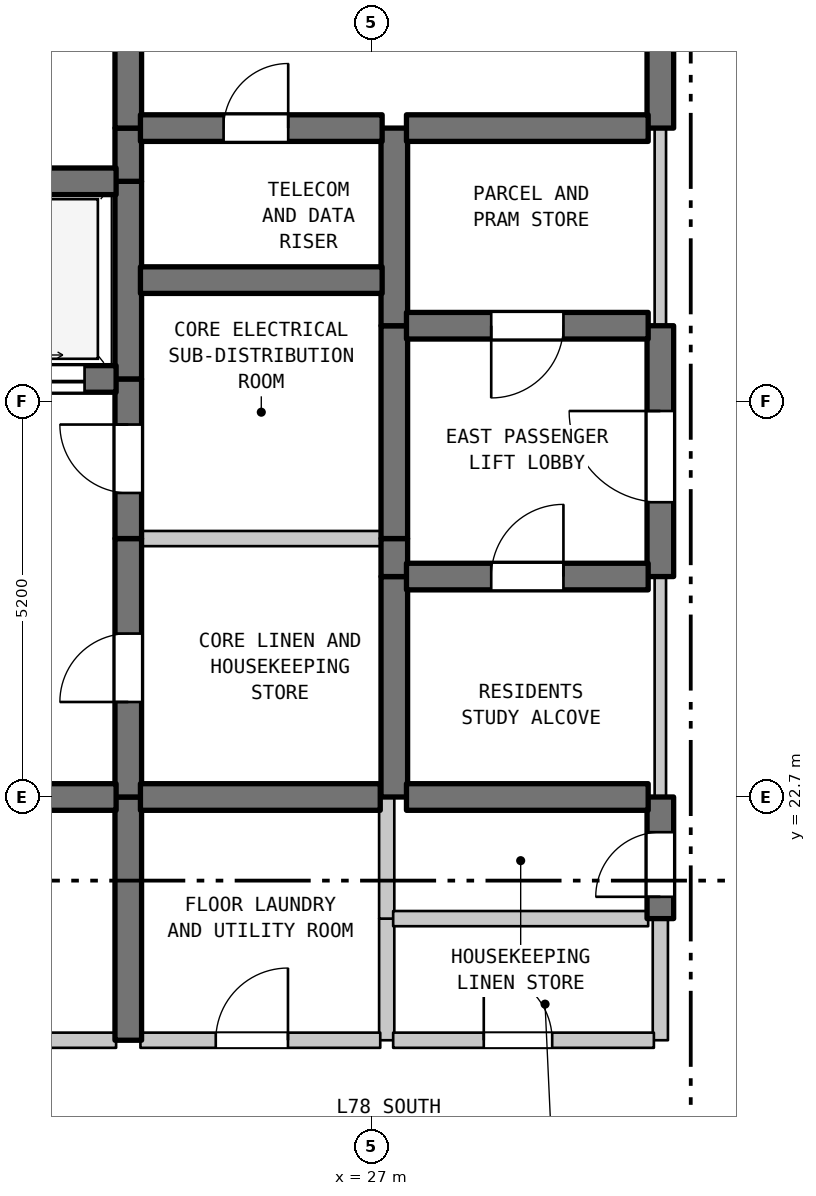
"""IFC4 building model, lengths in metres.
Left out: names, types, materials, properties, quantities, classifications, styles, units other than length and angle.
Written with IfcOpenShell. Run it as: python <this file> out.ifc"""

import sys

from ifc_helpers import new_model, si_unit, direction, frame, frame_2d, origin, place, context, subcontext, project, spatial, rectangle, extrude, element, fill, save


model = new_model("IFC4")
c1 = context("Model", 3, precision=1e-05, world=origin(), true_north=direction((0.0, 1.0)))
c2 = subcontext(c1, "Body", "Model", "MODEL_VIEW")
j1 = project(units=[si_unit("LENGTHUNIT", "METRE"), si_unit("PLANEANGLEUNIT", "RADIAN")], contexts=[c1])
p1 = place(None, origin())
s1 = spatial("IfcSite", under=j1, at=p1, CompositionType="ELEMENT")
p2 = place(p1, origin())
s2 = spatial("IfcBuilding", under=s1, at=p2, CompositionType="ELEMENT")
p3 = place(p2, frame((0.0, 0.0, 311.0)))
s3 = spatial("IfcBuildingStorey", under=s2, at=p3, CompositionType="ELEMENT", Elevation=311.0)
p4 = place(p3, frame((23.8, 19.5, 0.0), z_axis=(0.0, 0.0, 1.0), x_axis=(0.0, 1.0, 0.0)))
e1 = element("IfcWall", 1, at=p4, inside=s3, PredefinedType="SHEAR", context=c2, shape_type="SweptSolid", body=[
    extrude(rectangle(XDim=3.2, YDim=0.35, at=frame_2d((1.6, 0.0))), origin(), (0.0, 0.0, 1.0), 3.28),
])
p5 = place(p3, frame((23.8, 22.7, 0.0), z_axis=(0.0, 0.0, 1.0), x_axis=(0.0, 1.0, 0.0)))
e2 = element("IfcWall", 2, at=p5, inside=s3, PredefinedType="SHEAR", context=c2, shape_type="SweptSolid", body=[
    extrude(rectangle(XDim=3.4, YDim=0.35, at=frame_2d((1.7, 0.0))), origin(), (0.0, 0.0, 1.0), 3.28),
])
p6 = place(p5, frame((1.25, 0.0, 0.0)))
e3 = element("IfcOpeningElement", 3, at=p6, cuts=e2, PredefinedType="OPENING", context=c2, shape_type="SweptSolid", body=[
    extrude(rectangle(XDim=0.9, YDim=2.15, at=frame_2d((0.45, 1.075))), frame((0.0, 0.185, 0.0), z_axis=(0.0, -1.0, 0.0), x_axis=(1.0, 0.0, 0.0)), (0.0, 0.0, 1.0), 0.37),
])
p7 = place(p3, frame((23.8, 26.1, 0.0), z_axis=(0.0, 0.0, 1.0), x_axis=(0.0, 1.0, 0.0)))
e4 = element("IfcWall", 4, at=p7, inside=s3, PredefinedType="SHEAR", context=c2, shape_type="SweptSolid", body=[
    extrude(rectangle(XDim=2.1, YDim=0.35, at=frame_2d((1.05, 0.0))), origin(), (0.0, 0.0, 1.0), 3.28),
])
p8 = place(p7, frame((0.6, 0.0, 0.0)))
e5 = element("IfcOpeningElement", 5, at=p8, cuts=e4, PredefinedType="OPENING", context=c2, shape_type="SweptSolid", body=[
    extrude(rectangle(XDim=0.9, YDim=2.15, at=frame_2d((0.45, 1.075))), frame((0.0, 0.185, 0.0), z_axis=(0.0, -1.0, 0.0), x_axis=(1.0, 0.0, 0.0)), (0.0, 0.0, 1.0), 0.37),
])
p9 = place(p3, frame((23.8, 28.2, 0.0), z_axis=(0.0, 0.0, 1.0), x_axis=(0.0, 1.0, 0.0)))
e6 = element("IfcWall", 6, at=p9, inside=s3, PredefinedType="SHEAR", context=c2, shape_type="SweptSolid", body=[
    extrude(rectangle(XDim=2.6, YDim=0.35, at=frame_2d((1.3, 0.0))), origin(), (0.0, 0.0, 1.0), 3.28),
])
p10 = place(p3, frame((23.8, 30.8, 0.0), z_axis=(0.0, 0.0, 1.0), x_axis=(0.0, 1.0, 0.0)))
e7 = element("IfcWall", 7, at=p10, inside=s3, PredefinedType="SHEAR", context=c2, shape_type="SweptSolid", body=[
    extrude(rectangle(XDim=0.7, YDim=0.35, at=frame_2d((0.35, 0.0))), origin(), (0.0, 0.0, 1.0), 3.28),
])
p11 = place(p3, frame((23.8, 31.5, 0.0), z_axis=(0.0, 0.0, 1.0), x_axis=(0.0, 1.0, 0.0)))
e8 = element("IfcWall", 8, at=p11, inside=s3, PredefinedType="SHEAR", context=c2, shape_type="SweptSolid", body=[
    extrude(rectangle(XDim=3.5, YDim=0.35, at=frame_2d((1.75, 0.0))), origin(), (0.0, 0.0, 1.0), 3.28),
])
p12 = place(p11, frame((1.127, 0.0, 0.0)))
e9 = element("IfcOpeningElement", 9, at=p12, cuts=e8, PredefinedType="OPENING", context=c2, shape_type="SweptSolid", body=[
    extrude(rectangle(XDim=1.1, YDim=2.15, at=frame_2d((0.55, 1.075))), frame((0.0, 0.185, 0.0), z_axis=(0.0, -1.0, 0.0), x_axis=(1.0, 0.0, 0.0)), (0.0, 0.0, 1.0), 0.37),
])
p13 = place(p3, frame((27.2, 19.5, 0.0), z_axis=(0.0, 0.0, 1.0), x_axis=(0.0, 1.0, 0.0)))
e10 = element("IfcWall", 10, at=p13, inside=s3, PredefinedType="STANDARD", context=c2, shape_type="SweptSolid", body=[
    extrude(rectangle(XDim=1.6, YDim=0.2, at=frame_2d((0.8, 0.0))), origin(), (0.0, 0.0, 1.0), 3.28),
])
p14 = place(p3, frame((27.2, 21.1, 0.0), z_axis=(0.0, 0.0, 1.0), x_axis=(0.0, 1.0, 0.0)))
e11 = element("IfcWall", 11, at=p14, inside=s3, PredefinedType="STANDARD", context=c2, shape_type="SweptSolid", body=[
    extrude(rectangle(XDim=1.6, YDim=0.2, at=frame_2d((0.8, 0.0))), origin(), (0.0, 0.0, 1.0), 3.28),
])
p15 = place(p3, frame((27.3, 22.7, 0.0), z_axis=(0.0, 0.0, 1.0), x_axis=(0.0, 1.0, 0.0)))
e12 = element("IfcWall", 12, at=p15, inside=s3, PredefinedType="SHEAR", context=c2, shape_type="SweptSolid", body=[
    extrude(rectangle(XDim=2.9, YDim=0.35, at=frame_2d((1.45, 0.0))), origin(), (0.0, 0.0, 1.0), 3.28),
])
p16 = place(p3, frame((27.3, 25.6, 0.0), z_axis=(0.0, 0.0, 1.0), x_axis=(0.0, 1.0, 0.0)))
e13 = element("IfcWall", 13, at=p16, inside=s3, PredefinedType="SHEAR", context=c2, shape_type="SweptSolid", body=[
    extrude(rectangle(XDim=0.5, YDim=0.35, at=frame_2d((0.25, 0.0))), origin(), (0.0, 0.0, 1.0), 3.28),
])
p17 = place(p3, frame((27.3, 26.1, 0.0), z_axis=(0.0, 0.0, 1.0), x_axis=(0.0, 1.0, 0.0)))
e14 = element("IfcWall", 14, at=p17, inside=s3, PredefinedType="SHEAR", context=c2, shape_type="SweptSolid", body=[
    extrude(rectangle(XDim=2.8, YDim=0.35, at=frame_2d((1.4, 0.0))), origin(), (0.0, 0.0, 1.0), 3.28),
])
p18 = place(p3, frame((27.3, 28.9, 0.0), z_axis=(0.0, 0.0, 1.0), x_axis=(0.0, 1.0, 0.0)))
e15 = element("IfcWall", 15, at=p18, inside=s3, PredefinedType="SHEAR", context=c2, shape_type="SweptSolid", body=[
    extrude(rectangle(XDim=2.6, YDim=0.35, at=frame_2d((1.3, 0.0))), origin(), (0.0, 0.0, 1.0), 3.28),
])
p19 = place(p3, frame((30.8, 19.5, 0.0), z_axis=(0.0, 0.0, 1.0), x_axis=(0.0, 1.0, 0.0)))
e16 = element("IfcWall", 16, at=p19, inside=s3, PredefinedType="STANDARD", context=c2, shape_type="SweptSolid", body=[
    extrude(rectangle(XDim=1.6, YDim=0.2, at=frame_2d((0.8, 0.0))), origin(), (0.0, 0.0, 1.0), 3.28),
])
p20 = place(p3, frame((30.8, 21.1, 0.0), z_axis=(0.0, 0.0, 1.0), x_axis=(0.0, 1.0, 0.0)))
e17 = element("IfcWall", 17, at=p20, inside=s3, PredefinedType="SHEAR", context=c2, shape_type="SweptSolid", body=[
    extrude(rectangle(XDim=1.6, YDim=0.35, at=frame_2d((0.8, 0.0))), origin(), (0.0, 0.0, 1.0), 3.28),
])
p21 = place(p20, frame((0.287, 0.0, 0.0)))
e18 = element("IfcOpeningElement", 18, at=p21, cuts=e17, PredefinedType="OPENING", context=c2, shape_type="SweptSolid", body=[
    extrude(rectangle(XDim=0.85, YDim=2.1, at=frame_2d((0.425, 1.05))), frame((0.0, 0.185, 0.0), z_axis=(0.0, -1.0, 0.0), x_axis=(1.0, 0.0, 0.0)), (0.0, 0.0, 1.0), 0.37),
])
p22 = place(p3, frame((30.8, 22.7, 0.0), z_axis=(0.0, 0.0, 1.0), x_axis=(0.0, 1.0, 0.0)))
e19 = element("IfcWall", 19, at=p22, inside=s3, PredefinedType="STANDARD", context=c2, shape_type="SweptSolid", body=[
    extrude(rectangle(XDim=2.9, YDim=0.15, at=frame_2d((1.45, 0.0))), origin(), (0.0, 0.0, 1.0), 3.28),
])
p23 = place(p3, frame((30.8, 25.6, 0.0), z_axis=(0.0, 0.0, 1.0), x_axis=(0.0, 1.0, 0.0)))
e20 = element("IfcWall", 20, at=p23, inside=s3, PredefinedType="SHEAR", context=c2, shape_type="SweptSolid", body=[
    extrude(rectangle(XDim=3.3, YDim=0.35, at=frame_2d((1.65, 0.0))), origin(), (0.0, 0.0, 1.0), 3.28),
])
p24 = place(p23, frame((0.978, 0.0, 0.0)))
e21 = element("IfcOpeningElement", 21, at=p24, cuts=e20, PredefinedType="OPENING", context=c2, shape_type="SweptSolid", body=[
    extrude(rectangle(XDim=1.2, YDim=2.2, at=frame_2d((0.6, 1.1))), frame((0.0, 0.185, 0.0), z_axis=(0.0, -1.0, 0.0), x_axis=(1.0, 0.0, 0.0)), (0.0, 0.0, 1.0), 0.37),
])
p25 = place(p3, frame((30.8, 28.9, 0.0), z_axis=(0.0, 0.0, 1.0), x_axis=(0.0, 1.0, 0.0)))
e22 = element("IfcWall", 22, at=p25, inside=s3, PredefinedType="STANDARD", context=c2, shape_type="SweptSolid", body=[
    extrude(rectangle(XDim=2.6, YDim=0.15, at=frame_2d((1.3, 0.0))), origin(), (0.0, 0.0, 1.0), 3.28),
])
p26 = place(p3, frame((30.8, 31.5, 0.0), z_axis=(0.0, 0.0, 1.0), x_axis=(0.0, 1.0, 0.0)))
e23 = element("IfcWall", 23, at=p26, inside=s3, PredefinedType="SHEAR", context=c2, shape_type="SweptSolid", body=[
    extrude(rectangle(XDim=3.5, YDim=0.35, at=frame_2d((1.75, 0.0))), origin(), (0.0, 0.0, 1.0), 3.28),
])
p27 = place(p26, frame((1.15, 0.0, 0.0)))
e24 = element("IfcOpeningElement", 24, at=p27, cuts=e23, PredefinedType="OPENING", context=c2, shape_type="SweptSolid", body=[
    extrude(rectangle(XDim=1.2, YDim=2.2, at=frame_2d((0.6, 1.1))), frame((0.0, 0.185, 0.0), z_axis=(0.0, -1.0, 0.0), x_axis=(1.0, 0.0, 0.0)), (0.0, 0.0, 1.0), 0.37),
])
p28 = place(p3, frame((19.16, 19.5, 0.0), z_axis=(0.0, 0.0, 1.0), x_axis=(1.0, 0.0, 0.0)))
e25 = element("IfcWall", 25, at=p28, inside=s3, PredefinedType="STANDARD", context=c2, shape_type="SweptSolid", body=[
    extrude(rectangle(XDim=4.48, YDim=0.2, at=frame_2d((2.24, 0.0))), origin(), (0.0, 0.0, 1.0), 3.28),
])
p29 = place(p28, frame((1.64, 0.0, 0.0)))
e26 = element("IfcOpeningElement", 26, at=p29, cuts=e25, PredefinedType="OPENING", context=c2, shape_type="SweptSolid", body=[
    extrude(rectangle(XDim=1.2, YDim=2.2, at=frame_2d((0.6, 1.1))), frame((0.0, 0.11, 0.0), z_axis=(0.0, -1.0, 0.0), x_axis=(1.0, 0.0, 0.0)), (0.0, 0.0, 1.0), 0.22),
])
p30 = place(p3, frame((23.96, 19.5, 0.0), z_axis=(0.0, 0.0, 1.0), x_axis=(1.0, 0.0, 0.0)))
e27 = element("IfcWall", 27, at=p30, inside=s3, PredefinedType="STANDARD", context=c2, shape_type="SweptSolid", body=[
    extrude(rectangle(XDim=3.155, YDim=0.2, at=frame_2d((1.578, 0.0))), origin(), (0.0, 0.0, 1.0), 3.28),
])
p31 = place(p30, frame((0.991, 0.0, 0.0)))
e28 = element("IfcOpeningElement", 28, at=p31, cuts=e27, PredefinedType="OPENING", context=c2, shape_type="SweptSolid", body=[
    extrude(rectangle(XDim=0.95, YDim=2.15, at=frame_2d((0.475, 1.075))), frame((0.0, 0.11, 0.0), z_axis=(0.0, -1.0, 0.0), x_axis=(1.0, 0.0, 0.0)), (0.0, 0.0, 1.0), 0.22),
])
p32 = place(p3, frame((27.285, 19.5, 0.0), z_axis=(0.0, 0.0, 1.0), x_axis=(1.0, 0.0, 0.0)))
e29 = element("IfcWall", 29, at=p32, inside=s3, PredefinedType="STANDARD", context=c2, shape_type="SweptSolid", body=[
    extrude(rectangle(XDim=3.43, YDim=0.2, at=frame_2d((1.715, 0.0))), origin(), (0.0, 0.0, 1.0), 3.28),
])
p33 = place(p32, frame((1.192, 0.0, 0.0)))
e30 = element("IfcOpeningElement", 30, at=p33, cuts=e29, PredefinedType="OPENING", context=c2, shape_type="SweptSolid", body=[
    extrude(rectangle(XDim=0.9, YDim=2.15, at=frame_2d((0.45, 1.075))), frame((0.0, 0.11, 0.0), z_axis=(0.0, -1.0, 0.0), x_axis=(1.0, 0.0, 0.0)), (0.0, 0.0, 1.0), 0.22),
])
p34 = place(p3, frame((27.285, 21.1, 0.0), z_axis=(0.0, 0.0, 1.0), x_axis=(1.0, 0.0, 0.0)))
e31 = element("IfcWall", 31, at=p34, inside=s3, PredefinedType="STANDARD", context=c2, shape_type="SweptSolid", body=[
    extrude(rectangle(XDim=3.355, YDim=0.2, at=frame_2d((1.677, 0.0))), origin(), (0.0, 0.0, 1.0), 3.28),
])
p35 = place(p3, frame((19.16, 22.7, 0.0), z_axis=(0.0, 0.0, 1.0), x_axis=(1.0, 0.0, 0.0)))
e32 = element("IfcWall", 32, at=p35, inside=s3, PredefinedType="SHEAR", context=c2, shape_type="SweptSolid", body=[
    extrude(rectangle(XDim=4.48, YDim=0.35, at=frame_2d((2.24, 0.0))), origin(), (0.0, 0.0, 1.0), 3.28),
])
p36 = place(p35, frame((1.64, 0.0, 0.0)))
e33 = element("IfcOpeningElement", 33, at=p36, cuts=e32, PredefinedType="OPENING", context=c2, shape_type="SweptSolid", body=[
    extrude(rectangle(XDim=1.2, YDim=2.2, at=frame_2d((0.6, 1.1))), frame((0.0, 0.185, 0.0), z_axis=(0.0, -1.0, 0.0), x_axis=(1.0, 0.0, 0.0)), (0.0, 0.0, 1.0), 0.37),
])
p37 = place(p3, frame((23.96, 22.7, 0.0), z_axis=(0.0, 0.0, 1.0), x_axis=(1.0, 0.0, 0.0)))
e34 = element("IfcWall", 34, at=p37, inside=s3, PredefinedType="SHEAR", context=c2, shape_type="SweptSolid", body=[
    extrude(rectangle(XDim=3.155, YDim=0.35, at=frame_2d((1.578, 0.0))), origin(), (0.0, 0.0, 1.0), 3.28),
])
p38 = place(p3, frame((27.46, 22.7, 0.0), z_axis=(0.0, 0.0, 1.0), x_axis=(1.0, 0.0, 0.0)))
e35 = element("IfcWall", 35, at=p38, inside=s3, PredefinedType="SHEAR", context=c2, shape_type="SweptSolid", body=[
    extrude(rectangle(XDim=3.18, YDim=0.35, at=frame_2d((1.59, 0.0))), origin(), (0.0, 0.0, 1.0), 3.28),
])
p39 = place(p3, frame((27.46, 25.6, 0.0), z_axis=(0.0, 0.0, 1.0), x_axis=(1.0, 0.0, 0.0)))
e36 = element("IfcWall", 36, at=p39, inside=s3, PredefinedType="SHEAR", context=c2, shape_type="SweptSolid", body=[
    extrude(rectangle(XDim=3.18, YDim=0.35, at=frame_2d((1.59, 0.0))), origin(), (0.0, 0.0, 1.0), 3.28),
])
p40 = place(p39, frame((1.115, 0.0, 0.0)))
e37 = element("IfcOpeningElement", 37, at=p40, cuts=e36, PredefinedType="OPENING", context=c2, shape_type="SweptSolid", body=[
    extrude(rectangle(XDim=0.95, YDim=2.15, at=frame_2d((0.475, 1.075))), frame((0.0, 0.185, 0.0), z_axis=(0.0, -1.0, 0.0), x_axis=(1.0, 0.0, 0.0)), (0.0, 0.0, 1.0), 0.37),
])
p41 = place(p3, frame((23.96, 26.1, 0.0), z_axis=(0.0, 0.0, 1.0), x_axis=(1.0, 0.0, 0.0)))
e38 = element("IfcWall", 38, at=p41, inside=s3, PredefinedType="STANDARD", context=c2, shape_type="SweptSolid", body=[
    extrude(rectangle(XDim=3.18, YDim=0.2, at=frame_2d((1.59, 0.0))), origin(), (0.0, 0.0, 1.0), 3.28),
])
p42 = place(p3, frame((19.16, 28.2, 0.0), z_axis=(0.0, 0.0, 1.0), x_axis=(1.0, 0.0, 0.0)))
e39 = element("IfcWall", 39, at=p42, inside=s3, PredefinedType="SHEAR", context=c2, shape_type="SweptSolid", body=[
    extrude(rectangle(XDim=4.48, YDim=0.35, at=frame_2d((2.24, 0.0))), origin(), (0.0, 0.0, 1.0), 3.28),
])
p43 = place(p42, frame((0.415, 0.0, 0.0)))
e40 = element("IfcOpeningElement", 40, at=p43, cuts=e39, PredefinedType="OPENING", context=c2, shape_type="SweptSolid", body=[
    extrude(rectangle(XDim=1.25, YDim=2.2, at=frame_2d((0.625, 1.1))), frame((0.0, 0.185, 0.0), z_axis=(0.0, -1.0, 0.0), x_axis=(1.0, 0.0, 0.0)), (0.0, 0.0, 1.0), 0.37),
])
p44 = place(p42, frame((2.815, 0.0, 0.0)))
e41 = element("IfcOpeningElement", 41, at=p44, cuts=e39, PredefinedType="OPENING", context=c2, shape_type="SweptSolid", body=[
    extrude(rectangle(XDim=1.25, YDim=2.2, at=frame_2d((0.625, 1.1))), frame((0.0, 0.185, 0.0), z_axis=(0.0, -1.0, 0.0), x_axis=(1.0, 0.0, 0.0)), (0.0, 0.0, 1.0), 0.37),
])
p45 = place(p3, frame((27.46, 28.9, 0.0), z_axis=(0.0, 0.0, 1.0), x_axis=(1.0, 0.0, 0.0)))
e42 = element("IfcWall", 42, at=p45, inside=s3, PredefinedType="SHEAR", context=c2, shape_type="SweptSolid", body=[
    extrude(rectangle(XDim=3.18, YDim=0.35, at=frame_2d((1.59, 0.0))), origin(), (0.0, 0.0, 1.0), 3.28),
])
p46 = place(p45, frame((1.115, 0.0, 0.0)))
e43 = element("IfcOpeningElement", 43, at=p46, cuts=e42, PredefinedType="OPENING", context=c2, shape_type="SweptSolid", body=[
    extrude(rectangle(XDim=0.95, YDim=2.15, at=frame_2d((0.475, 1.075))), frame((0.0, 0.185, 0.0), z_axis=(0.0, -1.0, 0.0), x_axis=(1.0, 0.0, 0.0)), (0.0, 0.0, 1.0), 0.37),
])
p47 = place(p3, frame((23.96, 29.5, 0.0), z_axis=(0.0, 0.0, 1.0), x_axis=(1.0, 0.0, 0.0)))
e44 = element("IfcWall", 44, at=p47, inside=s3, PredefinedType="SHEAR", context=c2, shape_type="SweptSolid", body=[
    extrude(rectangle(XDim=3.18, YDim=0.35, at=frame_2d((1.59, 0.0))), origin(), (0.0, 0.0, 1.0), 3.28),
])
p48 = place(p3, frame((19.16, 30.8, 0.0), z_axis=(0.0, 0.0, 1.0), x_axis=(1.0, 0.0, 0.0)))
e45 = element("IfcWall", 45, at=p48, inside=s3, PredefinedType="SHEAR", context=c2, shape_type="SweptSolid", body=[
    extrude(rectangle(XDim=4.48, YDim=0.35, at=frame_2d((2.24, 0.0))), origin(), (0.0, 0.0, 1.0), 3.28),
])
p49 = place(p3, frame((23.96, 31.5, 0.0), z_axis=(0.0, 0.0, 1.0), x_axis=(1.0, 0.0, 0.0)))
e46 = element("IfcWall", 46, at=p49, inside=s3, PredefinedType="SHEAR", context=c2, shape_type="SweptSolid", body=[
    extrude(rectangle(XDim=3.18, YDim=0.35, at=frame_2d((1.59, 0.0))), origin(), (0.0, 0.0, 1.0), 3.28),
])
p50 = place(p49, frame((1.094, 0.0, 0.0)))
e47 = element("IfcOpeningElement", 47, at=p50, cuts=e46, PredefinedType="OPENING", context=c2, shape_type="SweptSolid", body=[
    extrude(rectangle(XDim=0.85, YDim=2.1, at=frame_2d((0.425, 1.05))), frame((0.0, 0.185, 0.0), z_axis=(0.0, -1.0, 0.0), x_axis=(1.0, 0.0, 0.0)), (0.0, 0.0, 1.0), 0.37),
])
p51 = place(p3, frame((27.46, 31.5, 0.0), z_axis=(0.0, 0.0, 1.0), x_axis=(1.0, 0.0, 0.0)))
e48 = element("IfcWall", 48, at=p51, inside=s3, PredefinedType="SHEAR", context=c2, shape_type="SweptSolid", body=[
    extrude(rectangle(XDim=3.18, YDim=0.35, at=frame_2d((1.59, 0.0))), origin(), (0.0, 0.0, 1.0), 3.28),
])
p52 = place(p6, origin())
e49 = element("IfcDoor", 49, at=p52, inside=s3, OperationType="SINGLE_SWING_LEFT", PredefinedType="DOOR", context=c2, shape_type="SweptSolid", body=[
    extrude(rectangle(XDim=0.9, YDim=2.15, at=frame_2d((0.45, 1.075))), frame((0.0, 0.025, 0.0), z_axis=(0.0, -1.0, 0.0), x_axis=(1.0, 0.0, 0.0)), (0.0, 0.0, 1.0), 0.05),
])
fill(e3, e49)
p53 = place(p8, origin())
e50 = element("IfcDoor", 50, at=p53, inside=s3, OperationType="SINGLE_SWING_RIGHT", PredefinedType="DOOR", context=c2, shape_type="SweptSolid", body=[
    extrude(rectangle(XDim=0.9, YDim=2.15, at=frame_2d((0.45, 1.075))), frame((0.0, 0.025, 0.0), z_axis=(0.0, -1.0, 0.0), x_axis=(1.0, 0.0, 0.0)), (0.0, 0.0, 1.0), 0.05),
])
fill(e5, e50)
p54 = place(p21, origin())
e51 = element("IfcDoor", 51, at=p54, inside=s3, OperationType="SINGLE_SWING_LEFT", PredefinedType="DOOR", context=c2, shape_type="SweptSolid", body=[
    extrude(rectangle(XDim=0.85, YDim=2.1, at=frame_2d((0.425, 1.05))), frame((0.0, 0.025, 0.0), z_axis=(0.0, -1.0, 0.0), x_axis=(1.0, 0.0, 0.0)), (0.0, 0.0, 1.0), 0.05),
])
fill(e18, e51)
p55 = place(p24, origin())
e52 = element("IfcDoor", 52, at=p55, inside=s3, OperationType="SINGLE_SWING_RIGHT", PredefinedType="DOOR", context=c2, shape_type="SweptSolid", body=[
    extrude(rectangle(XDim=1.2, YDim=2.2, at=frame_2d((0.6, 1.1))), frame((0.0, 0.025, 0.0), z_axis=(0.0, -1.0, 0.0), x_axis=(1.0, 0.0, 0.0)), (0.0, 0.0, 1.0), 0.05),
])
fill(e21, e52)
p56 = place(p31, origin())
e53 = element("IfcDoor", 53, at=p56, inside=s3, OperationType="SINGLE_SWING_RIGHT", PredefinedType="DOOR", context=c2, shape_type="SweptSolid", body=[
    extrude(rectangle(XDim=0.95, YDim=2.15, at=frame_2d((0.475, 1.075))), frame((0.0, 0.025, 0.0), z_axis=(0.0, -1.0, 0.0), x_axis=(1.0, 0.0, 0.0)), (0.0, 0.0, 1.0), 0.05),
])
fill(e28, e53)
p57 = place(p33, origin())
e54 = element("IfcDoor", 54, at=p57, inside=s3, OperationType="SINGLE_SWING_LEFT", PredefinedType="DOOR", context=c2, shape_type="SweptSolid", body=[
    extrude(rectangle(XDim=0.9, YDim=2.15, at=frame_2d((0.45, 1.075))), frame((0.0, 0.025, 0.0), z_axis=(0.0, -1.0, 0.0), x_axis=(1.0, 0.0, 0.0)), (0.0, 0.0, 1.0), 0.05),
])
fill(e30, e54)
p58 = place(p40, origin())
e55 = element("IfcDoor", 55, at=p58, inside=s3, OperationType="SINGLE_SWING_RIGHT", PredefinedType="DOOR", context=c2, shape_type="SweptSolid", body=[
    extrude(rectangle(XDim=0.95, YDim=2.15, at=frame_2d((0.475, 1.075))), frame((0.0, 0.025, 0.0), z_axis=(0.0, -1.0, 0.0), x_axis=(1.0, 0.0, 0.0)), (0.0, 0.0, 1.0), 0.05),
])
fill(e37, e55)
p59 = place(p44, origin())
e56 = element("IfcDoor", 56, at=p59, inside=s3, OperationType="DOUBLE_DOOR_SLIDING", PredefinedType="DOOR", context=c2, shape_type="SweptSolid", body=[
    extrude(rectangle(XDim=1.25, YDim=2.2, at=frame_2d((0.625, 1.1))), frame((0.0, 0.025, 0.0), z_axis=(0.0, -1.0, 0.0), x_axis=(1.0, 0.0, 0.0)), (0.0, 0.0, 1.0), 0.05),
])
fill(e41, e56)
p60 = place(p46, frame((0.95, 0.0, 0.0), z_axis=(0.0, 0.0, 1.0), x_axis=(-1.0, 0.0, 0.0)))
e57 = element("IfcDoor", 57, at=p60, inside=s3, OperationType="SINGLE_SWING_LEFT", PredefinedType="DOOR", context=c2, shape_type="SweptSolid", body=[
    extrude(rectangle(XDim=0.95, YDim=2.15, at=frame_2d((0.475, 1.075))), frame((0.0, 0.025, 0.0), z_axis=(0.0, -1.0, 0.0), x_axis=(1.0, 0.0, 0.0)), (0.0, 0.0, 1.0), 0.05),
])
fill(e43, e57)
p61 = place(p50, origin())
e58 = element("IfcDoor", 58, at=p61, inside=s3, OperationType="SINGLE_SWING_RIGHT", PredefinedType="DOOR", context=c2, shape_type="SweptSolid", body=[
    extrude(rectangle(XDim=0.85, YDim=2.1, at=frame_2d((0.425, 1.05))), frame((0.0, 0.025, 0.0), z_axis=(0.0, -1.0, 0.0), x_axis=(1.0, 0.0, 0.0)), (0.0, 0.0, 1.0), 0.05),
])
fill(e47, e58)
save(model, sys.argv[1])
